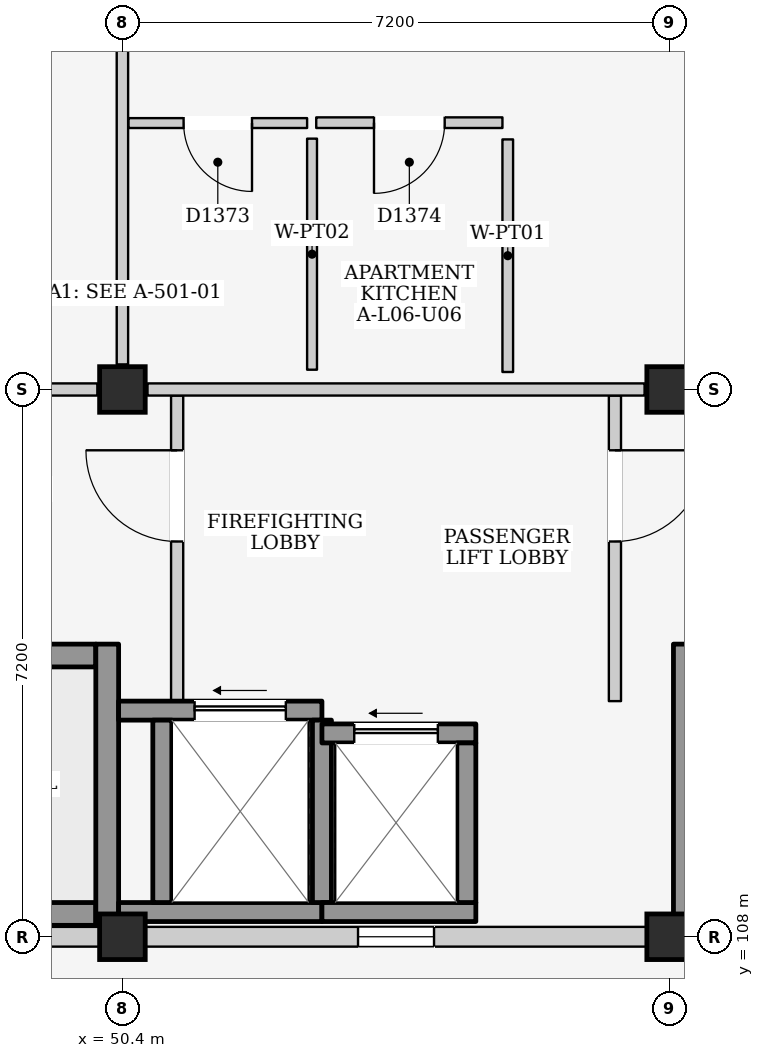
"""IFC4 building model, lengths in metres.
Left out: names, types, materials, properties, quantities, classifications, styles, units other than length and angle.
Written with IfcOpenShell. Run it as: python <this file> out.ifc"""

import sys

from ifc_helpers import new_model, si_unit, direction, frame, frame_2d, origin, origin_2d, place, context, subcontext, project, spatial, rectangle, extrude, element, fill, save


model = new_model("IFC4")
c1 = context("Model", 3, precision=1e-05, world=origin(), true_north=direction((0.0, 1.0)))
c2 = subcontext(c1, "Body", "Model", "MODEL_VIEW")
j1 = project(units=[si_unit("LENGTHUNIT", "METRE"), si_unit("PLANEANGLEUNIT", "RADIAN")], contexts=[c1])
p1 = place(None, origin())
s1 = spatial("IfcSite", under=j1, at=p1, CompositionType="ELEMENT")
p2 = place(p1, origin())
s2 = spatial("IfcBuilding", under=s1, at=p2, CompositionType="ELEMENT")
p3 = place(p2, frame((0.0, 0.0, 21.9)))
s3 = spatial("IfcBuildingStorey", under=s2, at=p3, CompositionType="ELEMENT", Elevation=21.9)
for number, where, z_axis, x_axis in (
    (1, (50.4, 108.0, 0.0), (0.0, 0.0, 1.0), (1.0, 0.0, 0.0)),
    (2, (50.4, 115.2, 0.0), (0.0, 0.0, 1.0), (1.0, 0.0, 0.0)),
    (3, (57.6, 108.0, 0.0), (0.0, 0.0, 1.0), (1.0, 0.0, 0.0)),
    (4, (57.6, 115.2, 0.0), (0.0, 0.0, 1.0), (1.0, 0.0, 0.0)),
):
    element("IfcColumn", number, at=place(p3, frame(where, z_axis=z_axis, x_axis=x_axis)), inside=s3, PredefinedType="COLUMN", context=c2, shape_type="SweptSolid", body=[
        extrude(rectangle(XDim=0.6, YDim=0.6, at=origin_2d()), origin(), (0.0, 0.0, 1.0), 3.2),
    ])
p4 = place(p3, frame((43.5, 108.0, 0.0), z_axis=(0.0, 0.0, 1.0), x_axis=(1.0, 0.0, 0.0)))
e5 = element("IfcWall", 5, at=p4, inside=s3, PredefinedType="ELEMENTEDWALL", context=c2, shape_type="SweptSolid", body=[
    extrude(rectangle(XDim=6.6, YDim=0.26, at=frame_2d((3.3, 0.0))), origin(), (0.0, 0.0, 1.0), 2.315),
])
p5 = place(p4, frame((2.8, 0.0, 1.2)))
e6 = element("IfcOpeningElement", 6, at=p5, cuts=e5, PredefinedType="OPENING", context=c2, shape_type="SweptSolid", body=[
    extrude(rectangle(XDim=1.0, YDim=0.9, at=frame_2d((0.5, 0.45))), frame((0.0, 0.145, 0.0), z_axis=(0.0, -1.0, 0.0), x_axis=(1.0, 0.0, 0.0)), (0.0, 0.0, 1.0), 0.29),
])
p6 = place(p3, frame((50.7, 108.0, 0.0), z_axis=(0.0, 0.0, 1.0), x_axis=(1.0, 0.0, 0.0)))
e7 = element("IfcWall", 7, at=p6, inside=s3, PredefinedType="ELEMENTEDWALL", context=c2, shape_type="SweptSolid", body=[
    extrude(rectangle(XDim=6.6, YDim=0.26, at=frame_2d((3.3, 0.0))), origin(), (0.0, 0.0, 1.0), 2.315),
])
p7 = place(p6, frame((2.8, 0.0, 1.2)))
e8 = element("IfcOpeningElement", 8, at=p7, cuts=e7, PredefinedType="OPENING", context=c2, shape_type="SweptSolid", body=[
    extrude(rectangle(XDim=1.0, YDim=0.9, at=frame_2d((0.5, 0.45))), frame((0.0, 0.145, 0.0), z_axis=(0.0, -1.0, 0.0), x_axis=(1.0, 0.0, 0.0)), (0.0, 0.0, 1.0), 0.29),
])
p8 = place(p3, frame((43.55, 108.3, 0.0), z_axis=(0.0, 0.0, 1.0), x_axis=(1.0, 0.0, 0.0)))
e9 = element("IfcWall", 9, at=p8, inside=s3, PredefinedType="SHEAR", context=c2, shape_type="SweptSolid", body=[
    extrude(rectangle(XDim=6.5, YDim=0.3, at=frame_2d((3.25, 0.0))), origin(), (0.0, 0.0, 1.0), 2.98),
])
p9 = place(p3, frame((43.55, 111.7, 0.0), z_axis=(0.0, 0.0, 1.0), x_axis=(1.0, 0.0, 0.0)))
e10 = element("IfcWall", 10, at=p9, inside=s3, PredefinedType="SHEAR", context=c2, shape_type="SweptSolid", body=[
    extrude(rectangle(XDim=6.5, YDim=0.3, at=frame_2d((3.25, 0.0))), origin(), (0.0, 0.0, 1.0), 2.98),
])
p10 = place(p9, frame((0.18, 0.0, 0.0)))
e11 = element("IfcOpeningElement", 11, at=p10, cuts=e10, PredefinedType="OPENING", context=c2, shape_type="SweptSolid", body=[
    extrude(rectangle(XDim=1.15, YDim=2.2, at=frame_2d((0.575, 1.1))), frame((0.0, 0.165, 0.0), z_axis=(0.0, -1.0, 0.0), x_axis=(1.0, 0.0, 0.0)), (0.0, 0.0, 1.0), 0.33),
])
p11 = place(p3, frame((50.2, 108.15, 0.0), z_axis=(0.0, 0.0, 1.0), x_axis=(0.0, 1.0, 0.0)))
e12 = element("IfcWall", 12, at=p11, inside=s3, PredefinedType="SHEAR", context=c2, shape_type="SweptSolid", body=[
    extrude(rectangle(XDim=3.7, YDim=0.3, at=frame_2d((1.85, 0.0))), origin(), (0.0, 0.0, 1.0), 2.98),
])
p12 = place(p3, frame((51.12, 111.1, 0.0), z_axis=(0.0, 0.0, 1.0), x_axis=(0.0, 1.0, 0.0)))
e13 = element("IfcWall", 13, at=p12, inside=s3, PredefinedType="PARTITIONING", context=c2, shape_type="SweptSolid", body=[
    extrude(rectangle(XDim=4.02, YDim=0.16, at=frame_2d((2.01, 0.0))), origin(), (0.0, 0.0, 1.0), 2.98),
])
p13 = place(p12, frame((2.1, 0.0, 0.0)))
e14 = element("IfcOpeningElement", 14, at=p13, cuts=e13, PredefinedType="OPENING", context=c2, shape_type="SweptSolid", body=[
    extrude(rectangle(XDim=1.2, YDim=2.2, at=frame_2d((0.6, 1.1))), frame((0.0, 0.095, 0.0), z_axis=(0.0, -1.0, 0.0), x_axis=(1.0, 0.0, 0.0)), (0.0, 0.0, 1.0), 0.19),
])
p14 = place(p3, frame((56.88, 111.1, 0.0), z_axis=(0.0, 0.0, 1.0), x_axis=(0.0, 1.0, 0.0)))
e15 = element("IfcWall", 15, at=p14, inside=s3, PredefinedType="PARTITIONING", context=c2, shape_type="SweptSolid", body=[
    extrude(rectangle(XDim=4.02, YDim=0.16, at=frame_2d((2.01, 0.0))), origin(), (0.0, 0.0, 1.0), 2.98),
])
p15 = place(p14, frame((2.1, 0.0, 0.0)))
e16 = element("IfcOpeningElement", 16, at=p15, cuts=e15, PredefinedType="OPENING", context=c2, shape_type="SweptSolid", body=[
    extrude(rectangle(XDim=1.2, YDim=2.2, at=frame_2d((0.6, 1.1))), frame((0.0, 0.095, 0.0), z_axis=(0.0, -1.0, 0.0), x_axis=(1.0, 0.0, 0.0)), (0.0, 0.0, 1.0), 0.19),
])
p16 = place(p3, frame((50.35, 108.325, 0.0), z_axis=(0.0, 0.0, 1.0), x_axis=(1.0, 0.0, 0.0)))
e17 = element("IfcWall", 17, at=p16, inside=s3, PredefinedType="SHEAR", context=c2, shape_type="SweptSolid", body=[
    extrude(rectangle(XDim=2.675, YDim=0.25, at=frame_2d((1.337, 0.0))), origin(), (0.0, 0.0, 1.0), 2.98),
])
p17 = place(p3, frame((50.35, 110.975, 0.0), z_axis=(0.0, 0.0, 1.0), x_axis=(1.0, 0.0, 0.0)))
e18 = element("IfcWall", 18, at=p17, inside=s3, PredefinedType="SHEAR", context=c2, shape_type="SweptSolid", body=[
    extrude(rectangle(XDim=2.675, YDim=0.25, at=frame_2d((1.337, 0.0))), origin(), (0.0, 0.0, 1.0), 2.98),
])
p18 = place(p17, frame((1.0, 0.0, 0.0)))
e19 = element("IfcOpeningElement", 19, at=p18, cuts=e18, PredefinedType="OPENING", context=c2, shape_type="SweptSolid", body=[
    extrude(rectangle(XDim=1.2, YDim=2.25, at=frame_2d((0.6, 1.125))), frame((0.0, 0.14, 0.0), z_axis=(0.0, -1.0, 0.0), x_axis=(1.0, 0.0, 0.0)), (0.0, 0.0, 1.0), 0.28),
])
for number, where, z_axis, x_axis in (
    (20, (50.925, 108.45, 0.0), (0.0, 0.0, 1.0), (0.0, 1.0, 0.0)),
    (21, (53.025, 108.45, 0.0), (0.0, 0.0, 1.0), (0.0, 1.0, 0.0)),
):
    element("IfcWall", number, at=place(p3, frame(where, z_axis=z_axis, x_axis=x_axis)), inside=s3, PredefinedType="SHEAR", context=c2, shape_type="SweptSolid", body=[
        extrude(rectangle(XDim=2.4, YDim=0.25, at=frame_2d((1.2, 0.0))), origin(), (0.0, 0.0, 1.0), 2.98),
    ])
p19 = place(p3, frame((53.025, 108.325, 0.0), z_axis=(0.0, 0.0, 1.0), x_axis=(1.0, 0.0, 0.0)))
e22 = element("IfcWall", 22, at=p19, inside=s3, PredefinedType="SHEAR", context=c2, shape_type="SweptSolid", body=[
    extrude(rectangle(XDim=2.025, YDim=0.25, at=frame_2d((1.013, 0.0))), origin(), (0.0, 0.0, 1.0), 2.98),
])
p20 = place(p3, frame((53.025, 110.675, 0.0), z_axis=(0.0, 0.0, 1.0), x_axis=(1.0, 0.0, 0.0)))
e23 = element("IfcWall", 23, at=p20, inside=s3, PredefinedType="SHEAR", context=c2, shape_type="SweptSolid", body=[
    extrude(rectangle(XDim=2.025, YDim=0.25, at=frame_2d((1.013, 0.0))), origin(), (0.0, 0.0, 1.0), 2.98),
])
p21 = place(p20, frame((0.425, 0.0, 0.0)))
e24 = element("IfcOpeningElement", 24, at=p21, cuts=e23, PredefinedType="OPENING", context=c2, shape_type="SweptSolid", body=[
    extrude(rectangle(XDim=1.1, YDim=2.15, at=frame_2d((0.55, 1.075))), frame((0.0, 0.14, 0.0), z_axis=(0.0, -1.0, 0.0), x_axis=(1.0, 0.0, 0.0)), (0.0, 0.0, 1.0), 0.28),
])
p22 = place(p3, frame((54.925, 108.45, 0.0), z_axis=(0.0, 0.0, 1.0), x_axis=(0.0, 1.0, 0.0)))
e25 = element("IfcWall", 25, at=p22, inside=s3, PredefinedType="SHEAR", context=c2, shape_type="SweptSolid", body=[
    extrude(rectangle(XDim=2.1, YDim=0.25, at=frame_2d((1.05, 0.0))), origin(), (0.0, 0.0, 1.0), 2.98),
])
p23 = place(p3, frame((57.8, 108.15, 0.0), z_axis=(0.0, 0.0, 1.0), x_axis=(0.0, 1.0, 0.0)))
e26 = element("IfcWall", 26, at=p23, inside=s3, PredefinedType="SHEAR", context=c2, shape_type="SweptSolid", body=[
    extrude(rectangle(XDim=3.7, YDim=0.3, at=frame_2d((1.85, 0.0))), origin(), (0.0, 0.0, 1.0), 2.98),
])
p24 = place(p3, frame((43.53, 115.2, 0.0), z_axis=(0.0, 0.0, 1.0), x_axis=(1.0, 0.0, 0.0)))
e27 = element("IfcWall", 27, at=p24, inside=s3, PredefinedType="PARTITIONING", context=c2, shape_type="SweptSolid", body=[
    extrude(rectangle(XDim=6.54, YDim=0.16, at=frame_2d((3.27, 0.0))), origin(), (0.0, 0.0, 1.0), 2.315),
])
p25 = place(p24, frame((2.77, 0.0, 0.0)))
e28 = element("IfcOpeningElement", 28, at=p25, cuts=e27, PredefinedType="OPENING", context=c2, shape_type="SweptSolid", body=[
    extrude(rectangle(XDim=1.0, YDim=2.15, at=frame_2d((0.5, 1.075))), frame((0.0, 0.095, 0.0), z_axis=(0.0, -1.0, 0.0), x_axis=(1.0, 0.0, 0.0)), (0.0, 0.0, 1.0), 0.19),
])
p26 = place(p3, frame((50.4, 115.53, 0.0), z_axis=(0.0, 0.0, 1.0), x_axis=(0.0, 1.0, 0.0)))
e29 = element("IfcWall", 29, at=p26, inside=s3, PredefinedType="PARTITIONING", context=c2, shape_type="SweptSolid", body=[
    extrude(rectangle(XDim=6.54, YDim=0.15, at=frame_2d((3.27, 0.0))), origin(), (0.0, 0.0, 1.0), 2.465),
])
p27 = place(p3, frame((50.73, 115.2, 0.0), z_axis=(0.0, 0.0, 1.0), x_axis=(1.0, 0.0, 0.0)))
e30 = element("IfcWall", 30, at=p27, inside=s3, PredefinedType="PARTITIONING", context=c2, shape_type="SweptSolid", body=[
    extrude(rectangle(XDim=6.54, YDim=0.16, at=frame_2d((3.27, 0.0))), origin(), (0.0, 0.0, 1.0), 2.315),
])
p28 = place(p3, frame((50.48, 118.705, 0.0), z_axis=(0.0, 0.0, 1.0), x_axis=(1.0, 0.0, 0.0)))
e31 = element("IfcWall", 31, at=p28, inside=s3, PredefinedType="PARTITIONING", context=c2, shape_type="SweptSolid", body=[
    extrude(rectangle(XDim=2.35, YDim=0.13, at=frame_2d((1.175, 0.0))), origin(), (0.0, 0.0, 1.0), 2.98),
])
p29 = place(p28, frame((0.725, 0.0, 0.0)))
e32 = element("IfcOpeningElement", 32, at=p29, cuts=e31, PredefinedType="OPENING", context=c2, shape_type="SweptSolid", body=[
    extrude(rectangle(XDim=0.9, YDim=2.1, at=frame_2d((0.45, 1.05))), frame((0.0, 0.08, 0.0), z_axis=(0.0, -1.0, 0.0), x_axis=(1.0, 0.0, 0.0)), (0.0, 0.0, 1.0), 0.16),
])
p30 = place(p3, frame((52.895, 115.46, 0.0), z_axis=(0.0, 0.0, 1.0), x_axis=(0.0, 1.0, 0.0)))
e33 = element("IfcWall", 33, at=p30, inside=s3, PredefinedType="PARTITIONING", context=c2, shape_type="SweptSolid", body=[
    extrude(rectangle(XDim=3.04, YDim=0.13, at=frame_2d((1.52, 0.0))), origin(), (0.0, 0.0, 1.0), 2.98),
])
p31 = place(p3, frame((52.95, 118.71, 0.0), z_axis=(0.0, 0.0, 1.0), x_axis=(1.0, 0.0, 0.0)))
e34 = element("IfcWall", 34, at=p31, inside=s3, PredefinedType="PARTITIONING", context=c2, shape_type="SweptSolid", body=[
    extrude(rectangle(XDim=2.45, YDim=0.14, at=frame_2d((1.225, 0.0))), origin(), (0.0, 0.0, 1.0), 2.98),
])
p32 = place(p31, frame((0.76, 0.0, 0.0)))
e35 = element("IfcOpeningElement", 35, at=p32, cuts=e34, PredefinedType="OPENING", context=c2, shape_type="SweptSolid", body=[
    extrude(rectangle(XDim=0.93, YDim=2.14, at=frame_2d((0.465, 1.07))), frame((0.0, 0.085, 0.0), z_axis=(0.0, -1.0, 0.0), x_axis=(1.0, 0.0, 0.0)), (0.0, 0.0, 1.0), 0.17),
])
p33 = place(p3, frame((55.47, 115.43, 0.0), z_axis=(0.0, 0.0, 1.0), x_axis=(0.0, 1.0, 0.0)))
e36 = element("IfcWall", 36, at=p33, inside=s3, PredefinedType="PARTITIONING", context=c2, shape_type="SweptSolid", body=[
    extrude(rectangle(XDim=3.06, YDim=0.14, at=frame_2d((1.53, 0.0))), origin(), (0.0, 0.0, 1.0), 2.98),
])
p34 = place(p7, origin())
e37 = element("IfcWindow", 37, at=p34, inside=s3, PartitioningType="SINGLE_PANEL", PredefinedType="WINDOW", context=c2, shape_type="SweptSolid", body=[
    extrude(rectangle(XDim=1.0, YDim=0.9, at=frame_2d((0.5, 0.45))), frame((0.0, 0.03, 0.0), z_axis=(0.0, -1.0, 0.0), x_axis=(1.0, 0.0, 0.0)), (0.0, 0.0, 1.0), 0.06),
])
fill(e8, e37)
p35 = place(p13, origin())
e38 = element("IfcDoor", 38, at=p35, inside=s3, OperationType="SINGLE_SWING_RIGHT", PredefinedType="DOOR", context=c2, shape_type="SweptSolid", body=[
    extrude(rectangle(XDim=1.2, YDim=2.2, at=frame_2d((0.6, 1.1))), frame((0.0, 0.025, 0.0), z_axis=(0.0, -1.0, 0.0), x_axis=(1.0, 0.0, 0.0)), (0.0, 0.0, 1.0), 0.05),
])
fill(e14, e38)
p36 = place(p15, frame((1.2, 0.0, 0.0), z_axis=(0.0, 0.0, 1.0), x_axis=(-1.0, 0.0, 0.0)))
e39 = element("IfcDoor", 39, at=p36, inside=s3, OperationType="SINGLE_SWING_LEFT", PredefinedType="DOOR", context=c2, shape_type="SweptSolid", body=[
    extrude(rectangle(XDim=1.2, YDim=2.2, at=frame_2d((0.6, 1.1))), frame((0.0, 0.025, 0.0), z_axis=(0.0, -1.0, 0.0), x_axis=(1.0, 0.0, 0.0)), (0.0, 0.0, 1.0), 0.05),
])
fill(e16, e39)
p37 = place(p18, origin())
e40 = element("IfcDoor", 40, at=p37, inside=s3, OperationType="SLIDING_TO_LEFT", PredefinedType="DOOR", context=c2, shape_type="SweptSolid", body=[
    extrude(rectangle(XDim=1.2, YDim=2.25, at=frame_2d((0.6, 1.125))), frame((0.0, 0.025, 0.0), z_axis=(0.0, -1.0, 0.0), x_axis=(1.0, 0.0, 0.0)), (0.0, 0.0, 1.0), 0.05),
])
fill(e19, e40)
p38 = place(p21, origin())
e41 = element("IfcDoor", 41, at=p38, inside=s3, OperationType="SLIDING_TO_LEFT", PredefinedType="DOOR", context=c2, shape_type="SweptSolid", body=[
    extrude(rectangle(XDim=1.1, YDim=2.15, at=frame_2d((0.55, 1.075))), frame((0.0, 0.025, 0.0), z_axis=(0.0, -1.0, 0.0), x_axis=(1.0, 0.0, 0.0)), (0.0, 0.0, 1.0), 0.05),
])
fill(e24, e41)
p39 = place(p29, frame((0.9, 0.0, 0.0), z_axis=(0.0, 0.0, 1.0), x_axis=(-1.0, 0.0, 0.0)))
e42 = element("IfcDoor", 42, at=p39, inside=s3, OperationType="SINGLE_SWING_LEFT", PredefinedType="DOOR", context=c2, shape_type="SweptSolid", body=[
    extrude(rectangle(XDim=0.9, YDim=2.1, at=frame_2d((0.45, 1.05))), frame((0.0, 0.025, 0.0), z_axis=(0.0, -1.0, 0.0), x_axis=(1.0, 0.0, 0.0)), (0.0, 0.0, 1.0), 0.05),
])
fill(e32, e42)
p40 = place(p32, frame((0.93, 0.0, 0.0), z_axis=(0.0, 0.0, 1.0), x_axis=(-1.0, 0.0, 0.0)))
e43 = element("IfcDoor", 43, at=p40, inside=s3, OperationType="SINGLE_SWING_RIGHT", PredefinedType="DOOR", context=c2, shape_type="SweptSolid", body=[
    extrude(rectangle(XDim=0.93, YDim=2.14, at=frame_2d((0.465, 1.07))), frame((0.0, 0.025, 0.0), z_axis=(0.0, -1.0, 0.0), x_axis=(1.0, 0.0, 0.0)), (0.0, 0.0, 1.0), 0.05),
])
fill(e35, e43)
save(model, sys.argv[1])
